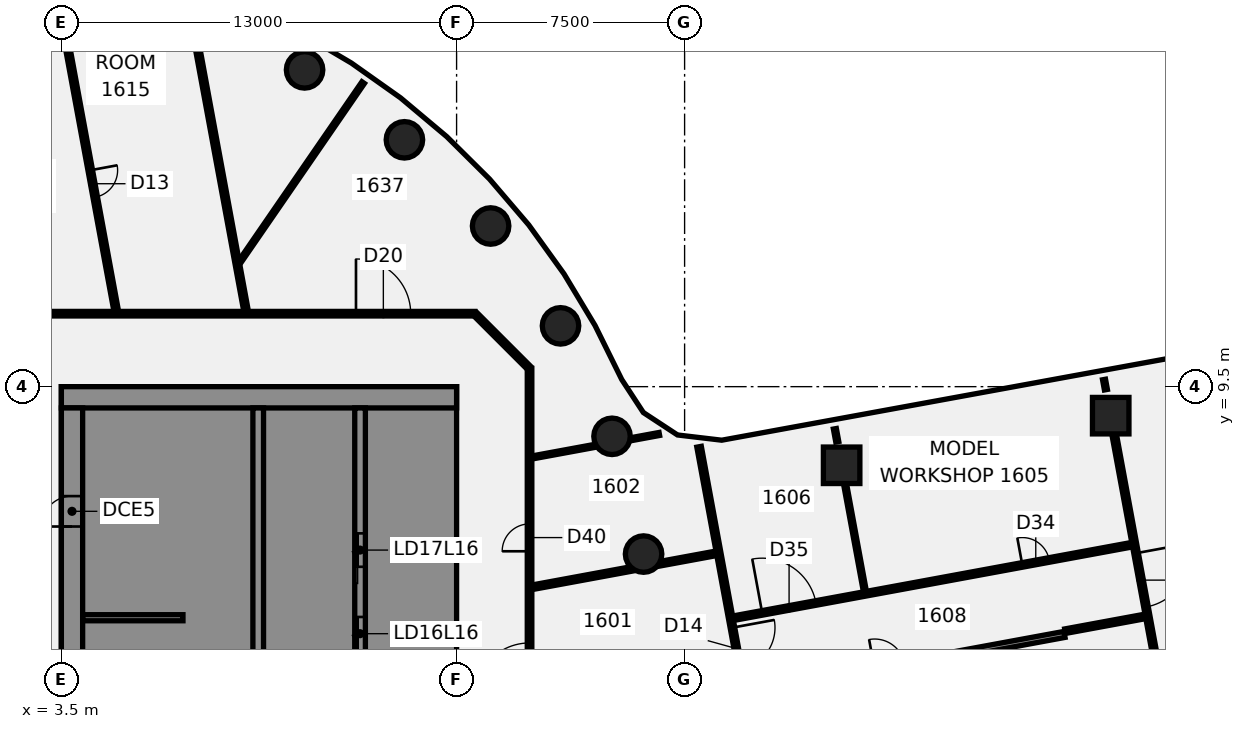
"""IFC4 building model, lengths in metres.
Left out: names, types, materials, properties, quantities, classifications, styles, units other than length and angle.
Written with IfcOpenShell. Run it as: python <this file> out.ifc"""

import sys

from ifc_helpers import new_model, si_unit, direction, frame, frame_2d, origin, origin_2d, place, context, subcontext, project, spatial, polyline, rectangle, circle, outline, extrude, element, fill, save


model = new_model("IFC4")
c1 = context("Model", 3, precision=1e-05, world=origin(), true_north=direction((0.0, 1.0)))
c2 = subcontext(c1, "Body", "Model", "MODEL_VIEW")
j1 = project(units=[si_unit("LENGTHUNIT", "METRE"), si_unit("PLANEANGLEUNIT", "RADIAN")], contexts=[c1])
p1 = place(None, origin())
s1 = spatial("IfcSite", under=j1, at=p1, CompositionType="ELEMENT")
p2 = place(p1, origin())
s2 = spatial("IfcBuilding", under=s1, at=p2, CompositionType="ELEMENT")
p3 = place(p2, frame((0.0, 0.0, 71.5)))
s3 = spatial("IfcBuildingStorey", under=s2, at=p3, CompositionType="ELEMENT", Elevation=71.5)
for number, where, z_axis, x_axis in (
    (1, (22.651, 3.994, -0.14), (0.0, 0.0, 1.0), (1.0, 0.0, 0.0)),
    (2, (21.613, 7.866, -0.14), (0.0, 0.0, 1.0), (1.0, 0.0, 0.0)),
    (3, (19.919, 11.5, -0.14), (0.0, 0.0, 1.0), (1.0, 0.0, 0.0)),
    (4, (17.619, 14.784, -0.14), (0.0, 0.0, 1.0), (1.0, 0.0, 0.0)),
    (5, (14.784, 17.619, -0.14), (0.0, 0.0, 1.0), (1.0, 0.0, 0.0)),
    (6, (11.5, 19.919, -0.14), (0.0, 0.0, 1.0), (1.0, 0.0, 0.0)),
):
    element("IfcColumn", number, at=place(p3, frame(where, z_axis=z_axis, x_axis=x_axis)), inside=s3, PredefinedType="COLUMN", context=c2, shape_type="SweptSolid", body=[
        extrude(circle(Radius=0.6, at=origin_2d()), origin(), (0.0, 0.0, 1.0), 3.75),
    ])
p4 = place(p3, frame((38.016, 8.546, -0.138), z_axis=(-0.042059833465, 0.077174601835, 0.996130037315), x_axis=(0.179297504528, -0.98024372476, 0.083514339719)))
e7 = element("IfcColumn", 7, at=p4, inside=s3, PredefinedType="COLUMN", context=c2, shape_type="SweptSolid", body=[
    extrude(rectangle(XDim=1.2, YDim=1.2, at=origin_2d()), origin(), (0.0, 0.0, 1.0), 3.761),
])
p5 = place(p3, frame((29.165, 6.914, -0.139), z_axis=(-0.033903859141, 0.034489530412, 0.998829815648), x_axis=(0.180809351928, -0.982701571274, 0.040069939744)))
e8 = element("IfcColumn", 8, at=p5, inside=s3, PredefinedType="COLUMN", context=c2, shape_type="SweptSolid", body=[
    extrude(rectangle(XDim=1.2, YDim=1.2, at=origin_2d()), origin(), (0.0, 0.0, 1.0), 3.752),
])
p6 = place(p3, frame((3.213, 23.329, 0.0), z_axis=(0.0, 0.0, 1.0), x_axis=(0.181332407235, -0.983421861709, 0.0)))
e9 = element("IfcWall", 9, at=p6, inside=s3, PredefinedType="PARTITIONING", context=c2, shape_type="SweptSolid", body=[
    extrude(rectangle(XDim=11.552, YDim=0.15, at=frame_2d((5.776, 0.0))), origin(), (0.0, 0.0, 1.0), 3.01),
])
p7 = place(p6, frame((6.825, 0.0, 0.0)))
e10 = element("IfcOpeningElement", 10, at=p7, cuts=e9, PredefinedType="OPENING", context=c2, shape_type="SweptSolid", body=[
    extrude(rectangle(XDim=0.9, YDim=2.1, at=frame_2d((0.45, 1.05))), frame((0.0, 0.085, 0.0), z_axis=(0.0, -1.0, 0.0), x_axis=(1.0, 0.0, 0.0)), (0.0, 0.0, 1.0), 0.17),
])
p8 = place(p3, frame((7.91, 21.015, 0.0), z_axis=(0.0, 0.0, 1.0), x_axis=(0.181358331946, -0.983417081117, 0.0)))
e11 = element("IfcWall", 11, at=p8, inside=s3, PredefinedType="PARTITIONING", context=c2, shape_type="SweptSolid", body=[
    extrude(rectangle(XDim=9.198, YDim=0.15, at=frame_2d((4.599, 0.0))), origin(), (0.0, 0.0, 1.0), 3.01),
])
p9 = place(p3, frame((24.476, 7.524, 0.0), z_axis=(0.0, 0.0, 1.0), x_axis=(0.181354544685, -0.983417779543, 0.0)))
e12 = element("IfcWall", 12, at=p9, inside=s3, PredefinedType="PARTITIONING", context=c2, shape_type="SweptSolid", body=[
    extrude(rectangle(XDim=13.649, YDim=0.15, at=frame_2d((6.825, 0.0))), origin(), (0.0, 0.0, 1.0), 3.01),
])
p10 = place(p9, frame((6.05, 0.0, 0.0)))
e13 = element("IfcOpeningElement", 13, at=p10, cuts=e12, PredefinedType="OPENING", context=c2, shape_type="SweptSolid", body=[
    extrude(rectangle(XDim=1.4, YDim=2.1, at=frame_2d((0.7, 1.05))), frame((0.0, 0.085, 0.0), z_axis=(0.0, -1.0, 0.0), x_axis=(1.0, 0.0, 0.0)), (0.0, 0.0, 1.0), 0.17),
])
p11 = place(p3, frame((28.943, 8.114, 0.0), z_axis=(0.0, 0.0, 1.0), x_axis=(0.181706497485, -0.983352809917, 0.0)))
e14 = element("IfcWall", 14, at=p11, inside=s3, PredefinedType="PARTITIONING", context=c2, shape_type="SweptSolid", body=[
    extrude(rectangle(XDim=0.434, YDim=0.1, at=frame_2d((0.217, 0.0))), origin(), (0.0, 0.0, 1.0), 3.01),
])
p12 = place(p3, frame((29.279, 6.296, 0.0), z_axis=(0.0, 0.0, 1.0), x_axis=(0.181488912805, -0.983392990889, 0.0)))
e15 = element("IfcWall", 15, at=p12, inside=s3, PredefinedType="PARTITIONING", context=c2, shape_type="SweptSolid", body=[
    extrude(rectangle(XDim=3.597, YDim=0.1, at=frame_2d((1.799, 0.0))), origin(), (0.0, 0.0, 1.0), 3.01),
])
p13 = place(p3, frame((37.796, 9.735, 0.0), z_axis=(0.0, 0.0, 1.0), x_axis=(0.181472778981, -0.98339596831, 0.0)))
e16 = element("IfcWall", 16, at=p13, inside=s3, PredefinedType="PARTITIONING", context=c2, shape_type="SweptSolid", body=[
    extrude(rectangle(XDim=0.34, YDim=0.1, at=frame_2d((0.17, 0.0))), origin(), (0.0, 0.0, 1.0), 3.01),
])
p14 = place(p3, frame((38.115, 8.009, 0.0), z_axis=(0.0, 0.0, 1.0), x_axis=(0.181474017758, -0.983395739709, 0.0)))
e17 = element("IfcWall", 17, at=p14, inside=s3, PredefinedType="PARTITIONING", context=c2, shape_type="SweptSolid", body=[
    extrude(rectangle(XDim=9.592, YDim=0.15, at=frame_2d((4.796, 0.0))), origin(), (0.0, 0.0, 1.0), 3.01),
])
p15 = place(p14, frame((4.054, 0.0, 0.0)))
e18 = element("IfcOpeningElement", 18, at=p15, cuts=e17, PredefinedType="OPENING", context=c2, shape_type="SweptSolid", body=[
    extrude(rectangle(XDim=1.8, YDim=2.1, at=frame_2d((0.9, 1.05))), frame((0.0, 0.085, 0.0), z_axis=(0.0, -1.0, 0.0), x_axis=(1.0, 0.0, 0.0)), (0.0, 0.0, 1.0), 0.17),
])
p16 = place(p3, frame((17.128, 11.872, 0.0), z_axis=(0.0, 0.0, 1.0), x_axis=(0.707106781187, -0.707106781187, 0.0)))
e19 = element("IfcWall", 19, at=p16, inside=s3, PredefinedType="PARTITIONING", context=c2, shape_type="SweptSolid", body=[
    extrude(rectangle(XDim=2.465, YDim=0.15, at=frame_2d((1.232, 0.0))), origin(), (0.0, 0.0, 1.0), 3.01),
])
p17 = place(p3, frame((-17.065, 11.9, 0.0), z_axis=(0.0, 0.0, 1.0), x_axis=(1.0, 0.0, 0.0)))
e20 = element("IfcWall", 20, at=p17, inside=s3, PredefinedType="PARTITIONING", context=c2, shape_type="SweptSolid", body=[
    extrude(rectangle(XDim=34.165, YDim=0.15, at=frame_2d((17.083, 0.0))), origin(), (0.0, 0.0, 1.0), 3.01),
])
p18 = place(p17, frame((18.02, 0.0, 0.0)))
e21 = element("IfcOpeningElement", 21, at=p18, cuts=e20, PredefinedType="OPENING", context=c2, shape_type="SweptSolid", body=[
    extrude(rectangle(XDim=1.8, YDim=2.1, at=frame_2d((0.9, 1.05))), frame((0.0, 0.085, 0.0), z_axis=(0.0, -1.0, 0.0), x_axis=(1.0, 0.0, 0.0)), (0.0, 0.0, 1.0), 0.17),
])
p19 = place(p17, frame((30.256, 0.0, 0.0)))
e22 = element("IfcOpeningElement", 22, at=p19, cuts=e20, PredefinedType="OPENING", context=c2, shape_type="SweptSolid", body=[
    extrude(rectangle(XDim=1.8, YDim=2.1, at=frame_2d((0.9, 1.05))), frame((0.0, 0.085, 0.0), z_axis=(0.0, -1.0, 0.0), x_axis=(1.0, 0.0, 0.0)), (0.0, 0.0, 1.0), 0.17),
])
p20 = place(p17, frame((4.765, 0.0, 0.0)))
e23 = element("IfcOpeningElement", 23, at=p20, cuts=e20, PredefinedType="OPENING", context=c2, shape_type="SweptSolid", body=[
    extrude(rectangle(XDim=1.8, YDim=2.1, at=frame_2d((0.9, 1.05))), frame((0.0, 0.085, 0.0), z_axis=(0.0, -1.0, 0.0), x_axis=(1.0, 0.0, 0.0)), (0.0, 0.0, 1.0), 0.17),
])
p21 = place(p3, frame((18.969, 2.899, 0.0), z_axis=(0.0, 0.0, 1.0), x_axis=(0.983420380574, 0.181340439705, 0.0)))
e24 = element("IfcWall", 24, at=p21, inside=s3, PredefinedType="PARTITIONING", context=c2, shape_type="SweptSolid", body=[
    extrude(rectangle(XDim=3.386, YDim=0.15, at=frame_2d((1.693, 0.0))), origin(), (0.0, 0.0, 1.0), 3.01),
])
p22 = place(p3, frame((23.162, 3.672, 0.0), z_axis=(0.0, 0.0, 1.0), x_axis=(0.983424500457, 0.181318095899, 0.0)))
e25 = element("IfcWall", 25, at=p22, inside=s3, PredefinedType="PARTITIONING", context=c2, shape_type="SweptSolid", body=[
    extrude(rectangle(XDim=1.916, YDim=0.15, at=frame_2d((0.958, 0.0))), origin(), (0.0, 0.0, 1.0), 3.01),
])
p23 = place(p3, frame((18.969, 7.169, 0.0), z_axis=(0.0, 0.0, 1.0), x_axis=(0.983393076066, 0.181488451272, 0.0)))
e26 = element("IfcWall", 26, at=p23, inside=s3, PredefinedType="PARTITIONING", context=c2, shape_type="SweptSolid", body=[
    extrude(rectangle(XDim=2.154, YDim=0.1, at=frame_2d((1.077, 0.0))), origin(), (0.0, 0.0, 1.0), 3.01),
])
p24 = place(p3, frame((22.196, 7.764, 0.0), z_axis=(0.0, 0.0, 1.0), x_axis=(0.983393015188, 0.181488781138, 0.0)))
e27 = element("IfcWall", 27, at=p24, inside=s3, PredefinedType="PARTITIONING", context=c2, shape_type="SweptSolid", body=[
    extrude(rectangle(XDim=0.99, YDim=0.1, at=frame_2d((0.495, 0.0))), origin(), (0.0, 0.0, 1.0), 3.01),
])
p25 = place(p3, frame((25.598, 1.884, 0.0), z_axis=(0.0, 0.0, 1.0), x_axis=(0.983423155577, 0.181325390046, 0.0)))
e28 = element("IfcWall", 28, at=p25, inside=s3, PredefinedType="PARTITIONING", context=c2, shape_type="SweptSolid", body=[
    extrude(rectangle(XDim=13.346, YDim=0.15, at=frame_2d((6.673, 0.0))), origin(), (0.0, 0.0, 1.0), 3.01),
])
p26 = place(p25, frame((9.671, 0.0, 0.0)))
e29 = element("IfcOpeningElement", 29, at=p26, cuts=e28, PredefinedType="OPENING", context=c2, shape_type="SweptSolid", body=[
    extrude(rectangle(XDim=0.9, YDim=2.1, at=frame_2d((0.45, 1.05))), frame((0.0, 0.085, 0.0), z_axis=(0.0, -1.0, 0.0), x_axis=(1.0, 0.0, 0.0)), (0.0, 0.0, 1.0), 0.17),
])
p27 = place(p25, frame((0.97, 0.0, 0.0)))
e30 = element("IfcOpeningElement", 30, at=p27, cuts=e28, PredefinedType="OPENING", context=c2, shape_type="SweptSolid", body=[
    extrude(rectangle(XDim=1.8, YDim=2.1, at=frame_2d((0.9, 1.05))), frame((0.0, 0.085, 0.0), z_axis=(0.0, -1.0, 0.0), x_axis=(1.0, 0.0, 0.0)), (0.0, 0.0, 1.0), 0.17),
])
p28 = place(p3, frame((36.516, 1.458, 0.0), z_axis=(0.0, 0.0, 1.0), x_axis=(0.983414376978, 0.181372994552, 0.0)))
e31 = element("IfcWall", 31, at=p28, inside=s3, PredefinedType="PARTITIONING", context=c2, shape_type="SweptSolid", body=[
    extrude(rectangle(XDim=2.685, YDim=0.15, at=frame_2d((1.343, 0.0))), origin(), (0.0, 0.0, 1.0), 3.01),
])
p29 = place(p3, frame((9.372, 13.611, 0.0), z_axis=(0.0, 0.0, 1.0), x_axis=(0.567132866237, 0.823626318201, 0.0)))
e32 = element("IfcWall", 32, at=p29, inside=s3, PredefinedType="PARTITIONING", context=c2, shape_type="SweptSolid", body=[
    extrude(rectangle(XDim=7.151, YDim=0.1, at=frame_2d((3.576, 0.0))), origin(), (0.0, 0.0, 1.0), 3.01),
])
p30 = place(p3, frame((18.9, -10.1, 0.0), z_axis=(0.0, 0.0, 1.0), x_axis=(0.0, 1.0, 0.0)))
e33 = element("IfcWall", 33, at=p30, inside=s3, PredefinedType="PARTITIONING", context=c2, shape_type="SweptSolid", body=[
    extrude(rectangle(XDim=20.2, YDim=0.15, at=frame_2d((10.1, 0.0))), origin(), (0.0, 0.0, 1.0), 3.01),
])
p31 = place(p30, frame((9.371, 0.0, 0.0)))
e34 = element("IfcOpeningElement", 34, at=p31, cuts=e33, PredefinedType="OPENING", context=c2, shape_type="SweptSolid", body=[
    extrude(rectangle(XDim=1.8, YDim=2.1, at=frame_2d((0.9, 1.05))), frame((0.0, 0.085, 0.0), z_axis=(0.0, -1.0, 0.0), x_axis=(1.0, 0.0, 0.0)), (0.0, 0.0, 1.0), 0.17),
])
p32 = place(p30, frame((14.186, 0.0, 0.0)))
e35 = element("IfcOpeningElement", 35, at=p32, cuts=e33, PredefinedType="OPENING", context=c2, shape_type="SweptSolid", body=[
    extrude(rectangle(XDim=0.9, YDim=2.1, at=frame_2d((0.45, 1.05))), frame((0.0, 0.085, 0.0), z_axis=(0.0, -1.0, 0.0), x_axis=(1.0, 0.0, 0.0)), (0.0, 0.0, 1.0), 0.17),
])
p33 = place(p3, origin())
e36 = element("IfcWall", 36, at=p33, inside=s3, PredefinedType="SHEAR", context=c2, shape_type="SweptSolid", body=[
    extrude(outline(polyline([(13.5, -8.8), (15.8, -8.8), (16.5, -8.8), (16.5, 8.8), (15.8, 8.8), (13.5, 8.8), (13.5, 8.125), (15.8, 8.125), (15.8, 5.625), (13.5, 5.625), (13.5, 5.375), (15.8, 5.375), (15.8, 2.875), (13.5, 2.875), (13.5, 2.625), (15.8, 2.625), (15.8, 0.125), (13.5, 0.125), (13.5, -0.125), (15.8, -0.125), (15.8, -2.625), (13.5, -2.625), (13.5, -2.875), (15.8, -2.875), (15.8, -5.375), (13.5, -5.375), (13.5, -5.625), (15.8, -5.625), (15.8, -8.125), (13.5, -8.125), (13.5, -8.8)])), origin(), (0.0, 0.0, 1.0), 3.61),
])
p34 = place(p3, frame((16.5, 9.15, 0.0), z_axis=(0.0, 0.0, 1.0), x_axis=(-1.0, 0.0, 0.0)))
e37 = element("IfcWall", 37, at=p34, inside=s3, PredefinedType="SHEAR", context=c2, shape_type="SweptSolid", body=[
    extrude(rectangle(XDim=13.0, YDim=0.7, at=frame_2d((6.5, 0.0))), origin(), (0.0, 0.0, 1.0), 3.61),
])
p35 = place(p3, origin())
e38 = element("IfcWall", 38, at=p35, inside=s3, PredefinedType="SHEAR", context=c2, shape_type="SweptSolid", body=[
    extrude(outline(polyline([(9.8, -5.375), (7.5, -5.375), (7.5, -2.875), (9.8, -2.875), (9.8, -2.625), (7.5, -2.625), (7.5, -0.125), (9.8, -0.125), (9.8, 0.125), (7.5, 0.125), (7.5, 2.625), (9.8, 2.625), (9.8, 2.875), (7.5, 2.875), (7.5, 5.375), (9.8, 5.375), (9.8, 5.625), (7.5, 5.625), (7.5, 8.125), (9.8, 8.125), (9.8, 8.8), (7.5, 8.8), (7.15, 8.8), (7.15, -5.625), (7.5, -5.625), (9.8, -5.625), (9.8, -5.375)])), origin(), (0.0, 0.0, 1.0), 3.61),
])
p36 = place(p3, frame((7.5, 1.9, 0.0), z_axis=(0.0, 0.0, 1.0), x_axis=(-1.0, 0.0, 0.0)))
e39 = element("IfcWall", 39, at=p36, inside=s3, PredefinedType="SHEAR", context=c2, shape_type="SweptSolid", body=[
    extrude(rectangle(XDim=3.3, YDim=0.2, at=frame_2d((1.65, 0.0))), origin(), (0.0, 0.0, 1.0), 3.61),
])
p37 = place(p3, frame((13.325, -8.8, 0.0), z_axis=(0.0, 0.0, 1.0), x_axis=(0.0, 1.0, 0.0)))
e40 = element("IfcWall", 40, at=p37, inside=s3, PredefinedType="SHEAR", context=c2, shape_type="SweptSolid", body=[
    extrude(rectangle(XDim=17.6, YDim=0.35, at=frame_2d((8.8, 0.0))), origin(), (0.0, 0.0, 1.0), 3.61),
])
p38 = place(p37, frame((1.225, 0.0, 0.0)))
e41 = element("IfcOpeningElement", 41, at=p38, cuts=e40, PredefinedType="OPENING", context=c2, shape_type="SweptSolid", body=[
    extrude(rectangle(XDim=1.4, YDim=2.1, at=frame_2d((0.7, 1.05))), frame((0.0, 0.185, 0.0), z_axis=(0.0, -1.0, 0.0), x_axis=(1.0, 0.0, 0.0)), (0.0, 0.0, 1.0), 0.37),
])
p39 = place(p37, frame((4.125, 0.0, 0.0)))
e42 = element("IfcOpeningElement", 42, at=p39, cuts=e40, PredefinedType="OPENING", context=c2, shape_type="SweptSolid", body=[
    extrude(rectangle(XDim=1.1, YDim=2.1, at=frame_2d((0.55, 1.05))), frame((0.0, 0.185, 0.0), z_axis=(0.0, -1.0, 0.0), x_axis=(1.0, 0.0, 0.0)), (0.0, 0.0, 1.0), 0.37),
])
p40 = place(p37, frame((6.875, 0.0, 0.0)))
e43 = element("IfcOpeningElement", 43, at=p40, cuts=e40, PredefinedType="OPENING", context=c2, shape_type="SweptSolid", body=[
    extrude(rectangle(XDim=1.1, YDim=2.1, at=frame_2d((0.55, 1.05))), frame((0.0, 0.185, 0.0), z_axis=(0.0, -1.0, 0.0), x_axis=(1.0, 0.0, 0.0)), (0.0, 0.0, 1.0), 0.37),
])
p41 = place(p37, frame((9.625, 0.0, 0.0)))
e44 = element("IfcOpeningElement", 44, at=p41, cuts=e40, PredefinedType="OPENING", context=c2, shape_type="SweptSolid", body=[
    extrude(rectangle(XDim=1.1, YDim=2.1, at=frame_2d((0.55, 1.05))), frame((0.0, 0.185, 0.0), z_axis=(0.0, -1.0, 0.0), x_axis=(1.0, 0.0, 0.0)), (0.0, 0.0, 1.0), 0.37),
])
p42 = place(p37, frame((12.375, 0.0, 0.0)))
e45 = element("IfcOpeningElement", 45, at=p42, cuts=e40, PredefinedType="OPENING", context=c2, shape_type="SweptSolid", body=[
    extrude(rectangle(XDim=1.1, YDim=2.1, at=frame_2d((0.55, 1.05))), frame((0.0, 0.185, 0.0), z_axis=(0.0, -1.0, 0.0), x_axis=(1.0, 0.0, 0.0)), (0.0, 0.0, 1.0), 0.37),
])
p43 = place(p3, frame((9.975, -8.8, 0.0), z_axis=(0.0, 0.0, 1.0), x_axis=(0.0, 1.0, 0.0)))
e46 = element("IfcWall", 46, at=p43, inside=s3, PredefinedType="SHEAR", context=c2, shape_type="SweptSolid", body=[
    extrude(rectangle(XDim=17.6, YDim=0.35, at=frame_2d((8.8, 0.0))), origin(), (0.0, 0.0, 1.0), 3.61),
])
p44 = place(p3, frame((3.85, -8.8, 0.0), z_axis=(0.0, 0.0, 1.0), x_axis=(0.0, 1.0, 0.0)))
e47 = element("IfcWall", 47, at=p44, inside=s3, PredefinedType="SHEAR", context=c2, shape_type="SweptSolid", body=[
    extrude(rectangle(XDim=17.6, YDim=0.7, at=frame_2d((8.8, 0.0))), origin(), (0.0, 0.0, 1.0), 3.61),
])
p45 = place(p44, frame((1.15, 0.0, 0.0)))
e48 = element("IfcOpeningElement", 48, at=p45, cuts=e47, PredefinedType="OPENING", context=c2, shape_type="SweptSolid", body=[
    extrude(rectangle(XDim=1.8, YDim=2.1, at=frame_2d((0.9, 1.05))), frame((0.0, 0.36, 0.0), z_axis=(0.0, -1.0, 0.0), x_axis=(1.0, 0.0, 0.0)), (0.0, 0.0, 1.0), 0.72),
])
p46 = place(p44, frame((13.7, 0.0, 0.0)))
e49 = element("IfcOpeningElement", 49, at=p46, cuts=e47, PredefinedType="OPENING", context=c2, shape_type="SweptSolid", body=[
    extrude(rectangle(XDim=1.0, YDim=2.1, at=frame_2d((0.5, 1.05))), frame((0.0, 0.36, 0.0), z_axis=(0.0, -1.0, 0.0), x_axis=(1.0, 0.0, 0.0)), (0.0, 0.0, 1.0), 0.72),
])
p47 = place(p3, frame((29.872, 0.13, -0.14), z_axis=(0.0, 0.0, 1.0), x_axis=(0.983418500329, 0.181350636091, 0.0)))
e50 = element("IfcWall", 50, at=p47, inside=s3, PredefinedType="SHEAR", context=c2, shape_type="SweptSolid", body=[
    extrude(rectangle(XDim=6.735, YDim=0.2, at=frame_2d((3.368, 0.0))), origin(), (0.0, 0.0, 1.0), 3.15),
])
p48 = place(p47, frame((0.385, 0.0, 0.0)))
e51 = element("IfcOpeningElement", 51, at=p48, cuts=e50, PredefinedType="OPENING", context=c2, shape_type="SweptSolid", body=[
    extrude(rectangle(XDim=1.0, YDim=2.1, at=frame_2d((0.5, 1.05))), frame((0.0, 0.11, 0.0), z_axis=(0.0, -1.0, 0.0), x_axis=(1.0, 0.0, 0.0)), (0.0, 0.0, 1.0), 0.22),
])
p49 = place(p3, frame((0.0, 0.0, -0.14)))
e52 = element("IfcWall", 52, at=p49, inside=s3, PredefinedType="SHEAR", context=c2, shape_type="SweptSolid", body=[
    extrude(outline(polyline([(36.935, -2.137), (37.132, -2.101), (36.513, 1.253), (36.317, 1.216), (36.935, -2.137)])), origin(), (0.0, 0.0, 1.0), 3.15),
])
p50 = place(p7, origin())
e53 = element("IfcDoor", 53, at=p50, inside=s3, OperationType="SINGLE_SWING_LEFT", PredefinedType="DOOR", context=c2, shape_type="SweptSolid", body=[
    extrude(rectangle(XDim=0.9, YDim=2.1, at=frame_2d((0.45, 1.05))), frame((0.0, 0.025, 0.0), z_axis=(0.0, -1.0, 0.0), x_axis=(1.0, 0.0, 0.0)), (0.0, 0.0, 1.0), 0.05),
])
fill(e10, e53)
p51 = place(p10, frame((1.4, 0.0, 0.0), z_axis=(0.0, 0.0, 1.0), x_axis=(-1.0, 0.0, 0.0)))
e54 = element("IfcDoor", 54, at=p51, inside=s3, OperationType="DOUBLE_DOOR_SINGLE_SWING", PredefinedType="DOOR", context=c2, shape_type="SweptSolid", body=[
    extrude(rectangle(XDim=1.4, YDim=2.1, at=frame_2d((0.7, 1.05))), frame((0.0, 0.025, 0.0), z_axis=(0.0, -1.0, 0.0), x_axis=(1.0, 0.0, 0.0)), (0.0, 0.0, 1.0), 0.05),
])
fill(e13, e54)
p52 = place(p15, origin())
e55 = element("IfcDoor", 55, at=p52, inside=s3, OperationType="DOUBLE_DOOR_SINGLE_SWING", PredefinedType="DOOR", context=c2, shape_type="SweptSolid", body=[
    extrude(rectangle(XDim=1.8, YDim=2.1, at=frame_2d((0.9, 1.05))), frame((0.0, 0.025, 0.0), z_axis=(0.0, -1.0, 0.0), x_axis=(1.0, 0.0, 0.0)), (0.0, 0.0, 1.0), 0.05),
])
fill(e18, e55)
p53 = place(p19, origin())
e56 = element("IfcDoor", 56, at=p53, inside=s3, OperationType="DOUBLE_DOOR_SINGLE_SWING", PredefinedType="DOOR", context=c2, shape_type="SweptSolid", body=[
    extrude(rectangle(XDim=1.8, YDim=2.1, at=frame_2d((0.9, 1.05))), frame((0.0, 0.025, 0.0), z_axis=(0.0, -1.0, 0.0), x_axis=(1.0, 0.0, 0.0)), (0.0, 0.0, 1.0), 0.05),
])
fill(e22, e56)
p54 = place(p26, origin())
e57 = element("IfcDoor", 57, at=p54, inside=s3, OperationType="SINGLE_SWING_LEFT", PredefinedType="DOOR", context=c2, shape_type="SweptSolid", body=[
    extrude(rectangle(XDim=0.9, YDim=2.1, at=frame_2d((0.45, 1.05))), frame((0.0, 0.025, 0.0), z_axis=(0.0, -1.0, 0.0), x_axis=(1.0, 0.0, 0.0)), (0.0, 0.0, 1.0), 0.05),
])
fill(e29, e57)
p55 = place(p27, origin())
e58 = element("IfcDoor", 58, at=p55, inside=s3, OperationType="DOUBLE_DOOR_SINGLE_SWING", PredefinedType="DOOR", context=c2, shape_type="SweptSolid", body=[
    extrude(rectangle(XDim=1.8, YDim=2.1, at=frame_2d((0.9, 1.05))), frame((0.0, 0.025, 0.0), z_axis=(0.0, -1.0, 0.0), x_axis=(1.0, 0.0, 0.0)), (0.0, 0.0, 1.0), 0.05),
])
fill(e30, e58)
p56 = place(p31, origin())
e59 = element("IfcDoor", 59, at=p56, inside=s3, OperationType="DOUBLE_DOOR_SINGLE_SWING", PredefinedType="DOOR", context=c2, shape_type="SweptSolid", body=[
    extrude(rectangle(XDim=1.8, YDim=2.1, at=frame_2d((0.9, 1.05))), frame((0.0, 0.025, 0.0), z_axis=(0.0, -1.0, 0.0), x_axis=(1.0, 0.0, 0.0)), (0.0, 0.0, 1.0), 0.05),
])
fill(e34, e59)
p57 = place(p32, frame((0.9, 0.0, 0.0), z_axis=(0.0, 0.0, 1.0), x_axis=(-1.0, 0.0, 0.0)))
e60 = element("IfcDoor", 60, at=p57, inside=s3, OperationType="SINGLE_SWING_RIGHT", PredefinedType="DOOR", context=c2, shape_type="SweptSolid", body=[
    extrude(rectangle(XDim=0.9, YDim=2.1, at=frame_2d((0.45, 1.05))), frame((0.0, 0.025, 0.0), z_axis=(0.0, -1.0, 0.0), x_axis=(1.0, 0.0, 0.0)), (0.0, 0.0, 1.0), 0.05),
])
fill(e35, e60)
p58 = place(p46, origin())
e61 = element("IfcDoor", 61, at=p58, inside=s3, OperationType="SINGLE_SWING_LEFT", PredefinedType="DOOR", context=c2, shape_type="SweptSolid", body=[
    extrude(rectangle(XDim=1.0, YDim=2.1, at=frame_2d((0.5, 1.05))), frame((0.0, 0.025, 0.0), z_axis=(0.0, -1.0, 0.0), x_axis=(1.0, 0.0, 0.0)), (0.0, 0.0, 1.0), 0.05),
])
fill(e49, e61)
p59 = place(p41, origin())
e62 = element("IfcDoor", 62, at=p59, inside=s3, OperationType="SLIDING_TO_LEFT", PredefinedType="DOOR", context=c2, shape_type="SweptSolid", body=[
    extrude(rectangle(XDim=1.1, YDim=2.1, at=frame_2d((0.55, 1.05))), frame((0.0, 0.025, 0.0), z_axis=(0.0, -1.0, 0.0), x_axis=(1.0, 0.0, 0.0)), (0.0, 0.0, 1.0), 0.05),
])
fill(e44, e62)
p60 = place(p42, origin())
e63 = element("IfcDoor", 63, at=p60, inside=s3, OperationType="SLIDING_TO_LEFT", PredefinedType="DOOR", context=c2, shape_type="SweptSolid", body=[
    extrude(rectangle(XDim=1.1, YDim=2.1, at=frame_2d((0.55, 1.05))), frame((0.0, 0.025, 0.0), z_axis=(0.0, -1.0, 0.0), x_axis=(1.0, 0.0, 0.0)), (0.0, 0.0, 1.0), 0.05),
])
fill(e45, e63)
save(model, sys.argv[1])
